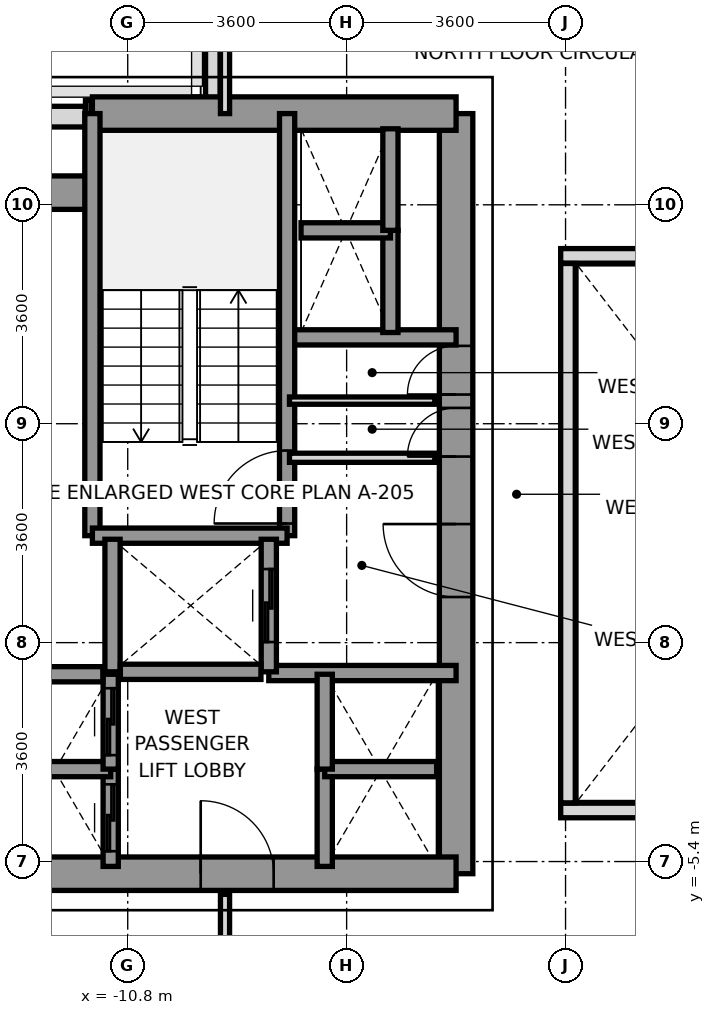
"""IFC4 building model, lengths in metres.
Left out: names, types, materials, properties, quantities, classifications, styles, units other than length and angle.
Written with IfcOpenShell. Run it as: python <this file> out.ifc"""

import sys

from ifc_helpers import new_model, si_unit, direction, frame, frame_2d, origin, place, context, subcontext, project, spatial, rectangle, extrude, source, transform, mapped, element, fill, save


model = new_model("IFC4")
c1 = context("Model", 3, precision=1e-05, world=origin(), true_north=direction((0.0, 1.0)))
c2 = subcontext(c1, "Body", "Model", "MODEL_VIEW")
j1 = project(units=[si_unit("LENGTHUNIT", "METRE"), si_unit("PLANEANGLEUNIT", "RADIAN")], contexts=[c1])
p1 = place(None, origin())
s1 = spatial("IfcSite", under=j1, at=p1, CompositionType="ELEMENT")
p2 = place(p1, origin())
s2 = spatial("IfcBuilding", under=s1, at=p2, CompositionType="ELEMENT")
p3 = place(p2, frame((0.0, 0.0, 44.2)))
s3 = spatial("IfcBuildingStorey", under=s2, at=p3, CompositionType="ELEMENT", Elevation=44.2)
p4 = place(p3, frame((-14.033, 6.85, 0.0), z_axis=(0.0, 0.0, 1.0), x_axis=(1.0, 0.0, 0.0)))
e1 = element("IfcWall", 1, at=p4, inside=s3, PredefinedType="SOLIDWALL", context=c2, shape_type="SweptSolid", body=[
    extrude(rectangle(XDim=2.535, YDim=0.34, at=frame_2d((1.268, 0.0))), origin(), (0.0, 0.0, 1.0), 3.2),
])
p5 = place(p3, frame((-11.495, 7.0, 0.0), z_axis=(0.0, 0.0, 1.0), x_axis=(1.0, 0.0, 0.0)))
e2 = element("IfcWall", 2, at=p5, inside=s3, PredefinedType="PARAPET", context=c2, shape_type="SweptSolid", body=[
    extrude(rectangle(XDim=0.092, YDim=0.24, at=frame_2d((0.046, 0.0))), origin(), (0.0, 0.0, 1.0), 1.15),
])
p6 = place(p3, frame((-9.4, 6.953, 0.0), z_axis=(0.0, 0.0, 1.0), x_axis=(0.0, 1.0, 0.0)))
e3 = element("IfcWall", 3, at=p6, inside=s3, PredefinedType="PARAPET", context=c2, shape_type="SweptSolid", body=[
    extrude(rectangle(XDim=1.444, YDim=0.24, at=frame_2d((0.722, 0.0))), origin(), (0.0, 0.0, 1.0), 1.15),
])
p7 = place(p3, frame((-5.4, -5.6, 0.0), z_axis=(0.0, 0.0, 1.0), x_axis=(0.0, 1.0, 0.0)))
e4 = element("IfcWall", 4, at=p7, inside=s3, PredefinedType="SHEAR", context=c2, shape_type="SweptSolid", body=[
    extrude(rectangle(XDim=12.5, YDim=0.55, at=frame_2d((6.25, 0.0))), origin(), (0.0, 0.0, 1.0), 3.2),
])
p8 = place(p7, frame((4.55, 0.0, 0.0)))
e5 = element("IfcOpeningElement", 5, at=p8, cuts=e4, PredefinedType="OPENING", context=c2, shape_type="SweptSolid", body=[
    extrude(rectangle(XDim=1.2, YDim=2.2, at=frame_2d((0.6, 1.1))), frame((0.0, 0.285, 0.0), z_axis=(0.0, -1.0, 0.0), x_axis=(1.0, 0.0, 0.0)), (0.0, 0.0, 1.0), 0.57),
])
p9 = place(p7, frame((6.86, 0.0, 0.0)))
e6 = element("IfcOpeningElement", 6, at=p9, cuts=e4, PredefinedType="OPENING", context=c2, shape_type="SweptSolid", body=[
    extrude(rectangle(XDim=0.8, YDim=2.1, at=frame_2d((0.4, 1.05))), frame((0.0, 0.285, 0.0), z_axis=(0.0, -1.0, 0.0), x_axis=(1.0, 0.0, 0.0)), (0.0, 0.0, 1.0), 0.57),
])
p10 = place(p7, frame((7.88, 0.0, 0.0)))
e7 = element("IfcOpeningElement", 7, at=p10, cuts=e4, PredefinedType="OPENING", context=c2, shape_type="SweptSolid", body=[
    extrude(rectangle(XDim=0.8, YDim=2.1, at=frame_2d((0.4, 1.05))), frame((0.0, 0.285, 0.0), z_axis=(0.0, -1.0, 0.0), x_axis=(1.0, 0.0, 0.0)), (0.0, 0.0, 1.0), 0.57),
])
p11 = place(p3, frame((-11.381, 6.9, 0.0), z_axis=(0.0, 0.0, 1.0), x_axis=(1.0, 0.0, 0.0)))
e8 = element("IfcWall", 8, at=p11, inside=s3, PredefinedType="SHEAR", context=c2, shape_type="SweptSolid", body=[
    extrude(rectangle(XDim=5.981, YDim=0.55, at=frame_2d((2.991, 0.0))), origin(), (0.0, 0.0, 1.0), 3.2),
])
p12 = place(p3, frame((-13.2, 5.6, 0.0), z_axis=(0.0, 0.0, 1.0), x_axis=(1.0, 0.0, 0.0)))
e9 = element("IfcWall", 9, at=p12, inside=s3, PredefinedType="SHEAR", context=c2, shape_type="SweptSolid", body=[
    extrude(rectangle(XDim=1.819, YDim=0.55, at=frame_2d((0.909, 0.0))), origin(), (0.0, 0.0, 1.0), 3.2),
])
p13 = place(p3, frame((-13.2, -5.6, 0.0), z_axis=(0.0, 0.0, 1.0), x_axis=(1.0, 0.0, 0.0)))
e10 = element("IfcWall", 10, at=p13, inside=s3, PredefinedType="SHEAR", context=c2, shape_type="SweptSolid", body=[
    extrude(rectangle(XDim=7.8, YDim=0.55, at=frame_2d((3.9, 0.0))), origin(), (0.0, 0.0, 1.0), 3.2),
])
p14 = place(p13, frame((3.6, 0.0, 0.0)))
e11 = element("IfcOpeningElement", 11, at=p14, cuts=e10, PredefinedType="OPENING", context=c2, shape_type="SweptSolid", body=[
    extrude(rectangle(XDim=1.2, YDim=2.2, at=frame_2d((0.6, 1.1))), frame((0.0, 0.285, 0.0), z_axis=(0.0, -1.0, 0.0), x_axis=(1.0, 0.0, 0.0)), (0.0, 0.0, 1.0), 0.57),
])
p15 = place(p3, frame((-8.18, 3.22, 0.0), z_axis=(0.0, 0.0, 1.0), x_axis=(1.0, 0.0, 0.0)))
e12 = element("IfcWall", 12, at=p15, inside=s3, PredefinedType="SOLIDWALL", context=c2, shape_type="SweptSolid", body=[
    extrude(rectangle(XDim=2.78, YDim=0.25, at=frame_2d((1.39, 0.0))), origin(), (0.0, 0.0, 1.0), 3.2),
])
p16 = place(p3, frame((-8.48, -2.3, 0.0), z_axis=(0.0, 0.0, 1.0), x_axis=(1.0, 0.0, 0.0)))
e13 = element("IfcWall", 13, at=p16, inside=s3, PredefinedType="SOLIDWALL", context=c2, shape_type="SweptSolid", body=[
    extrude(rectangle(XDim=3.08, YDim=0.25, at=frame_2d((1.54, 0.0))), origin(), (0.0, 0.0, 1.0), 3.2),
])
p17 = place(p3, frame((-8.179, -0.041, 0.0), z_axis=(0.0, 0.0, 1.0), x_axis=(0.0, 1.0, 0.0)))
e14 = element("IfcWall", 14, at=p17, inside=s3, PredefinedType="SOLIDWALL", context=c2, shape_type="SweptSolid", body=[
    extrude(rectangle(XDim=6.941, YDim=0.25, at=frame_2d((3.47, 0.0))), origin(), (0.0, 0.0, 1.0), 3.2),
])
p18 = place(p17, frame((0.2, 0.0, 0.0)))
e15 = element("IfcOpeningElement", 15, at=p18, cuts=e14, PredefinedType="OPENING", context=c2, shape_type="SweptSolid", body=[
    extrude(rectangle(XDim=1.2, YDim=2.2, at=frame_2d((0.6, 1.1))), frame((0.0, 0.135, 0.0), z_axis=(0.0, -1.0, 0.0), x_axis=(1.0, 0.0, 0.0)), (0.0, 0.0, 1.0), 0.27),
])
p19 = place(p3, frame((-11.381, -0.041, 0.0), z_axis=(0.0, 0.0, 1.0), x_axis=(0.0, 1.0, 0.0)))
e16 = element("IfcWall", 16, at=p19, inside=s3, PredefinedType="SOLIDWALL", context=c2, shape_type="SweptSolid", body=[
    extrude(rectangle(XDim=6.941, YDim=0.25, at=frame_2d((3.47, 0.0))), origin(), (0.0, 0.0, 1.0), 3.2),
])
p20 = place(p3, frame((-11.381, -0.041, 0.0), z_axis=(0.0, 0.0, 1.0), x_axis=(1.0, 0.0, 0.0)))
e17 = element("IfcWall", 17, at=p20, inside=s3, PredefinedType="SOLIDWALL", context=c2, shape_type="SweptSolid", body=[
    extrude(rectangle(XDim=3.202, YDim=0.25, at=frame_2d((1.601, 0.0))), origin(), (0.0, 0.0, 1.0), 3.2),
])
p21 = place(p3, frame((-11.05, -2.28, 0.0), z_axis=(0.0, 0.0, 1.0), x_axis=(0.0, 1.0, 0.0)))
e18 = element("IfcWall", 18, at=p21, inside=s3, PredefinedType="SOLIDWALL", context=c2, shape_type="SweptSolid", body=[
    extrude(rectangle(XDim=2.18, YDim=0.25, at=frame_2d((1.09, 0.0))), origin(), (0.0, 0.0, 1.0), 3.2),
])
p22 = place(p3, frame((-8.48, -2.28, 0.0), z_axis=(0.0, 0.0, 1.0), x_axis=(0.0, 1.0, 0.0)))
e19 = element("IfcWall", 19, at=p22, inside=s3, PredefinedType="SOLIDWALL", context=c2, shape_type="SweptSolid", body=[
    extrude(rectangle(XDim=2.18, YDim=0.25, at=frame_2d((1.09, 0.0))), origin(), (0.0, 0.0, 1.0), 3.2),
])
p23 = place(p22, frame((0.49, 0.0, 0.0)))
e20 = element("IfcOpeningElement", 20, at=p23, cuts=e19, PredefinedType="OPENING", context=c2, shape_type="SweptSolid", body=[
    extrude(rectangle(XDim=1.2, YDim=2.2, at=frame_2d((0.6, 1.1))), frame((0.0, 0.135, 0.0), z_axis=(0.0, -1.0, 0.0), x_axis=(1.0, 0.0, 0.0)), (0.0, 0.0, 1.0), 0.27),
])
p24 = place(p3, frame((-10.921, -2.28, 0.0), z_axis=(0.0, 0.0, 1.0), x_axis=(1.0, 0.0, 0.0)))
e21 = element("IfcWall", 21, at=p24, inside=s3, PredefinedType="SOLIDWALL", context=c2, shape_type="SweptSolid", body=[
    extrude(rectangle(XDim=2.312, YDim=0.25, at=frame_2d((1.156, 0.0))), origin(), (0.0, 0.0, 1.0), 3.2),
])
p25 = place(p3, frame((-11.08, -5.48, 0.0), z_axis=(0.0, 0.0, 1.0), x_axis=(0.0, 1.0, 0.0)))
e22 = element("IfcWall", 22, at=p25, inside=s3, PredefinedType="SOLIDWALL", context=c2, shape_type="SweptSolid", body=[
    extrude(rectangle(XDim=1.6, YDim=0.25, at=frame_2d((0.8, 0.0))), origin(), (0.0, 0.0, 1.0), 3.2),
])
p26 = place(p25, frame((0.25, 0.0, 0.0)))
e23 = element("IfcOpeningElement", 23, at=p26, cuts=e22, PredefinedType="OPENING", context=c2, shape_type="SweptSolid", body=[
    extrude(rectangle(XDim=1.1, YDim=2.2, at=frame_2d((0.55, 1.1))), frame((0.0, 0.135, 0.0), z_axis=(0.0, -1.0, 0.0), x_axis=(1.0, 0.0, 0.0)), (0.0, 0.0, 1.0), 0.27),
])
p27 = place(p3, frame((-12.92, -3.88, 0.0), z_axis=(0.0, 0.0, 1.0), x_axis=(1.0, 0.0, 0.0)))
e24 = element("IfcWall", 24, at=p27, inside=s3, PredefinedType="SOLIDWALL", context=c2, shape_type="SweptSolid", body=[
    extrude(rectangle(XDim=1.84, YDim=0.25, at=frame_2d((0.92, 0.0))), origin(), (0.0, 0.0, 1.0), 3.2),
])
p28 = place(p3, frame((-11.08, -3.88, 0.0), z_axis=(0.0, 0.0, 1.0), x_axis=(0.0, 1.0, 0.0)))
e25 = element("IfcWall", 25, at=p28, inside=s3, PredefinedType="SOLIDWALL", context=c2, shape_type="SweptSolid", body=[
    extrude(rectangle(XDim=1.56, YDim=0.25, at=frame_2d((0.78, 0.0))), origin(), (0.0, 0.0, 1.0), 3.2),
])
p29 = place(p28, frame((0.23, 0.0, 0.0)))
e26 = element("IfcOpeningElement", 26, at=p29, cuts=e25, PredefinedType="OPENING", context=c2, shape_type="SweptSolid", body=[
    extrude(rectangle(XDim=1.1, YDim=2.2, at=frame_2d((0.55, 1.1))), frame((0.0, 0.135, 0.0), z_axis=(0.0, -1.0, 0.0), x_axis=(1.0, 0.0, 0.0)), (0.0, 0.0, 1.0), 0.27),
])
p30 = place(p3, frame((-12.791, -2.32, 0.0), z_axis=(0.0, 0.0, 1.0), x_axis=(1.0, 0.0, 0.0)))
e27 = element("IfcWall", 27, at=p30, inside=s3, PredefinedType="SOLIDWALL", context=c2, shape_type="SweptSolid", body=[
    extrude(rectangle(XDim=1.582, YDim=0.25, at=frame_2d((0.791, 0.0))), origin(), (0.0, 0.0, 1.0), 3.2),
])
p31 = place(p3, frame((-7.56, -5.48, 0.0), z_axis=(0.0, 0.0, 1.0), x_axis=(0.0, 1.0, 0.0)))
e28 = element("IfcWall", 28, at=p31, inside=s3, PredefinedType="SOLIDWALL", context=c2, shape_type="SweptSolid", body=[
    extrude(rectangle(XDim=1.6, YDim=0.25, at=frame_2d((0.8, 0.0))), origin(), (0.0, 0.0, 1.0), 3.2),
])
p32 = place(p3, frame((-7.56, -3.88, 0.0), z_axis=(0.0, 0.0, 1.0), x_axis=(1.0, 0.0, 0.0)))
e29 = element("IfcWall", 29, at=p32, inside=s3, PredefinedType="SOLIDWALL", context=c2, shape_type="SweptSolid", body=[
    extrude(rectangle(XDim=1.84, YDim=0.25, at=frame_2d((0.92, 0.0))), origin(), (0.0, 0.0, 1.0), 3.2),
])
p33 = place(p3, frame((-7.56, -3.88, 0.0), z_axis=(0.0, 0.0, 1.0), x_axis=(0.0, 1.0, 0.0)))
e30 = element("IfcWall", 30, at=p33, inside=s3, PredefinedType="SOLIDWALL", context=c2, shape_type="SweptSolid", body=[
    extrude(rectangle(XDim=1.56, YDim=0.25, at=frame_2d((0.78, 0.0))), origin(), (0.0, 0.0, 1.0), 3.2),
])
p34 = place(p3, frame((-6.48, 3.3, 0.0), z_axis=(0.0, 0.0, 1.0), x_axis=(0.0, 1.0, 0.0)))
e31 = element("IfcWall", 31, at=p34, inside=s3, PredefinedType="SOLIDWALL", context=c2, shape_type="SweptSolid", body=[
    extrude(rectangle(XDim=1.68, YDim=0.25, at=frame_2d((0.84, 0.0))), origin(), (0.0, 0.0, 1.0), 3.2),
])
p35 = place(p3, frame((-7.95, 4.98, 0.0), z_axis=(0.0, 0.0, 1.0), x_axis=(1.0, 0.0, 0.0)))
e32 = element("IfcWall", 32, at=p35, inside=s3, PredefinedType="SOLIDWALL", context=c2, shape_type="SweptSolid", body=[
    extrude(rectangle(XDim=1.47, YDim=0.25, at=frame_2d((0.735, 0.0))), origin(), (0.0, 0.0, 1.0), 3.2),
])
p36 = place(p3, frame((-6.48, 4.98, 0.0), z_axis=(0.0, 0.0, 1.0), x_axis=(0.0, 1.0, 0.0)))
e33 = element("IfcWall", 33, at=p36, inside=s3, PredefinedType="SOLIDWALL", context=c2, shape_type="SweptSolid", body=[
    extrude(rectangle(XDim=1.67, YDim=0.25, at=frame_2d((0.835, 0.0))), origin(), (0.0, 0.0, 1.0), 3.2),
])
p37 = place(p3, frame((-8.14, 1.24, 0.0), z_axis=(0.0, 0.0, 1.0), x_axis=(1.0, 0.0, 0.0)))
e34 = element("IfcWall", 34, at=p37, inside=s3, PredefinedType="PARTITIONING", context=c2, shape_type="SweptSolid", body=[
    extrude(rectangle(XDim=2.39, YDim=0.15, at=frame_2d((1.195, 0.0))), origin(), (0.0, 0.0, 1.0), 2.3),
])
p38 = place(p3, frame((-8.14, 2.18, 0.0), z_axis=(0.0, 0.0, 1.0), x_axis=(1.0, 0.0, 0.0)))
e35 = element("IfcWall", 35, at=p38, inside=s3, PredefinedType="PARTITIONING", context=c2, shape_type="SweptSolid", body=[
    extrude(rectangle(XDim=2.39, YDim=0.12, at=frame_2d((1.195, 0.0))), origin(), (0.0, 0.0, 1.0), 2.3),
])
p39 = place(p3, frame((-9.2, 6.9, 0.0), z_axis=(0.0, 0.0, 1.0), x_axis=(0.0, 1.0, 0.0)))
e36 = element("IfcWall", 36, at=p39, inside=s3, PredefinedType="PARTITIONING", context=c2, shape_type="SweptSolid", body=[
    extrude(rectangle(XDim=8.78, YDim=0.15, at=frame_2d((4.39, 0.0))), origin(), (0.0, 0.0, 1.0), 2.65),
])
p40 = place(p3, frame((-9.2, -15.68, 0.0), z_axis=(0.0, 0.0, 1.0), x_axis=(0.0, 1.0, 0.0)))
e37 = element("IfcWall", 37, at=p40, inside=s3, PredefinedType="PARTITIONING", context=c2, shape_type="SweptSolid", body=[
    extrude(rectangle(XDim=9.74, YDim=0.15, at=frame_2d((4.87, 0.0))), origin(), (0.0, 0.0, 1.0), 2.65),
])
for number, where, z_axis, x_axis in (
    (38, (-3.68, -4.56, 0.0), (0.0, 0.0, 1.0), (1.0, 0.0, 0.0)),
    (39, (-3.68, 4.56, 0.0), (0.0, 0.0, 1.0), (1.0, 0.0, 0.0)),
):
    element("IfcWall", number, at=place(p3, frame(where, z_axis=z_axis, x_axis=x_axis)), inside=s3, PredefinedType="PARAPET", context=c2, shape_type="SweptSolid", body=[
        extrude(rectangle(XDim=7.36, YDim=0.24, at=frame_2d((3.68, 0.0))), origin(), (0.0, 0.0, 1.0), 1.15),
    ])
p41 = place(p3, frame((-3.56, -4.435, 0.0), z_axis=(0.0, 0.0, 1.0), x_axis=(0.0, 1.0, 0.0)))
e40 = element("IfcWall", 40, at=p41, inside=s3, PredefinedType="PARAPET", context=c2, shape_type="SweptSolid", body=[
    extrude(rectangle(XDim=8.87, YDim=0.24, at=frame_2d((4.435, 0.0))), origin(), (0.0, 0.0, 1.0), 1.15),
])
m1 = source(origin(), c2, "Body", "SweptSolid", [
    extrude(rectangle(XDim=1.2, YDim=2.2, at=frame_2d((0.6, 1.1))), frame((0.0, 0.025, 0.0), z_axis=(0.0, -1.0, 0.0), x_axis=(1.0, 0.0, 0.0)), (0.0, 0.0, 1.0), 0.05),
])
p42 = place(p18, origin())
e41 = element("IfcDoor", 41, at=p42, inside=s3, OperationType="SINGLE_SWING_LEFT", PredefinedType="DOOR", context=c2, shape_type="MappedRepresentation", body=[
    mapped(m1, transform((0.0, 0.0, 0.0), x_axis=(1.0, 0.0, 0.0), y_axis=(0.0, 1.0, 0.0), z_axis=(0.0, 0.0, 1.0), scale=1.0)),
])
fill(e15, e41)
p43 = place(p8, origin())
e42 = element("IfcDoor", 42, at=p43, inside=s3, OperationType="SINGLE_SWING_RIGHT", PredefinedType="DOOR", context=c2, shape_type="MappedRepresentation", body=[
    mapped(m1, transform((0.0, 0.0, 0.0), x_axis=(1.0, 0.0, 0.0), y_axis=(0.0, 1.0, 0.0), z_axis=(0.0, 0.0, 1.0), scale=1.0)),
])
fill(e5, e42)
p44 = place(p14, origin())
e43 = element("IfcDoor", 43, at=p44, inside=s3, OperationType="SINGLE_SWING_LEFT", PredefinedType="DOOR", context=c2, shape_type="MappedRepresentation", body=[
    mapped(m1, transform((0.0, 0.0, 0.0), x_axis=(1.0, 0.0, 0.0), y_axis=(0.0, 1.0, 0.0), z_axis=(0.0, 0.0, 1.0), scale=1.0)),
])
fill(e11, e43)
m2 = source(origin(), c2, "Body", "SweptSolid", [
    extrude(rectangle(XDim=0.8, YDim=2.1, at=frame_2d((0.4, 1.05))), frame((0.0, 0.025, 0.0), z_axis=(0.0, -1.0, 0.0), x_axis=(1.0, 0.0, 0.0)), (0.0, 0.0, 1.0), 0.05),
])
p45 = place(p9, origin())
e44 = element("IfcDoor", 44, at=p45, inside=s3, OperationType="SINGLE_SWING_LEFT", PredefinedType="DOOR", context=c2, shape_type="MappedRepresentation", body=[
    mapped(m2, transform((0.0, 0.0, 0.0), x_axis=(1.0, 0.0, 0.0), y_axis=(0.0, 1.0, 0.0), z_axis=(0.0, 0.0, 1.0), scale=1.0)),
])
fill(e6, e44)
p46 = place(p10, origin())
e45 = element("IfcDoor", 45, at=p46, inside=s3, OperationType="SINGLE_SWING_LEFT", PredefinedType="DOOR", context=c2, shape_type="MappedRepresentation", body=[
    mapped(m2, transform((0.0, 0.0, 0.0), x_axis=(1.0, 0.0, 0.0), y_axis=(0.0, 1.0, 0.0), z_axis=(0.0, 0.0, 1.0), scale=1.0)),
])
fill(e7, e45)
p47 = place(p23, origin())
e46 = element("IfcDoor", 46, at=p47, inside=s3, OperationType="SLIDING_TO_RIGHT", PredefinedType="DOOR", context=c2, shape_type="MappedRepresentation", body=[
    mapped(m1, transform((0.0, 0.0, 0.0), x_axis=(1.0, 0.0, 0.0), y_axis=(0.0, 1.0, 0.0), z_axis=(0.0, 0.0, 1.0), scale=1.0)),
])
fill(e20, e46)
m3 = source(origin(), c2, "Body", "SweptSolid", [
    extrude(rectangle(XDim=1.1, YDim=2.2, at=frame_2d((0.55, 1.1))), frame((0.0, 0.025, 0.0), z_axis=(0.0, -1.0, 0.0), x_axis=(1.0, 0.0, 0.0)), (0.0, 0.0, 1.0), 0.05),
])
p48 = place(p26, origin())
e47 = element("IfcDoor", 47, at=p48, inside=s3, OperationType="SLIDING_TO_LEFT", PredefinedType="DOOR", context=c2, shape_type="MappedRepresentation", body=[
    mapped(m3, transform((0.0, 0.0, 0.0), x_axis=(1.0, 0.0, 0.0), y_axis=(0.0, 1.0, 0.0), z_axis=(0.0, 0.0, 1.0), scale=1.0)),
])
fill(e23, e47)
p49 = place(p29, origin())
e48 = element("IfcDoor", 48, at=p49, inside=s3, OperationType="SLIDING_TO_LEFT", PredefinedType="DOOR", context=c2, shape_type="MappedRepresentation", body=[
    mapped(m3, transform((0.0, 0.0, 0.0), x_axis=(1.0, 0.0, 0.0), y_axis=(0.0, 1.0, 0.0), z_axis=(0.0, 0.0, 1.0), scale=1.0)),
])
fill(e26, e48)
save(model, sys.argv[1])
